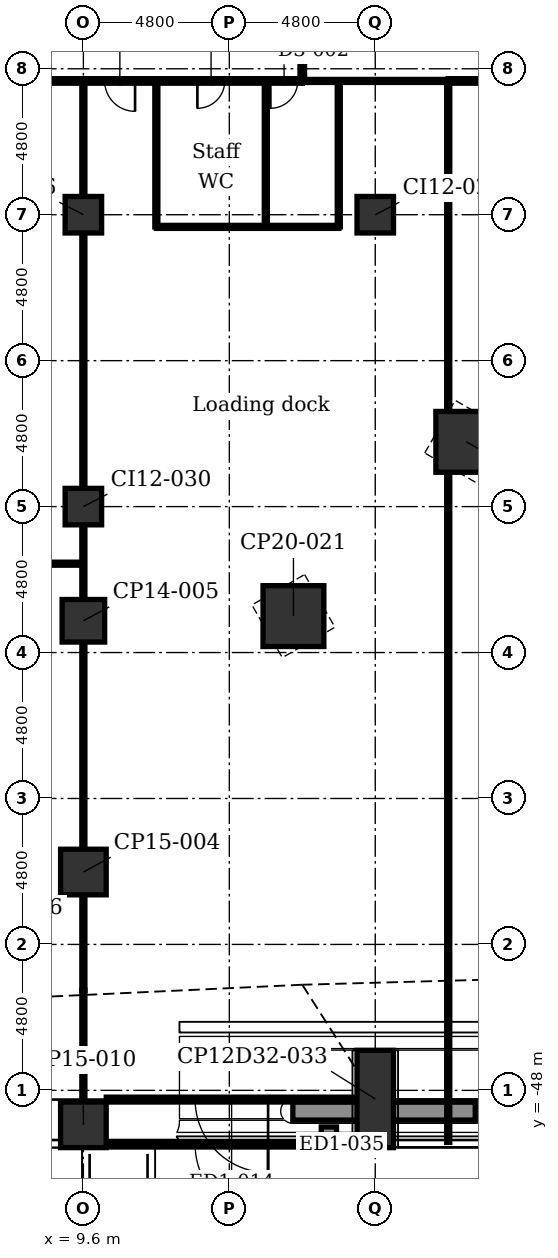
"""IFC4 building model, lengths in metres.
Left out: names, types, materials, properties, quantities, classifications, styles, units other than length and angle.
Written with IfcOpenShell. Run it as: python <this file> out.ifc"""

import sys

from ifc_helpers import new_model, si_unit, direction, frame, frame_2d, origin, origin_2d, place, context, subcontext, project, spatial, rectangle, extrude, element, fill, save


model = new_model("IFC4")
c1 = context("Model", 3, precision=1e-05, world=origin(), true_north=direction((0.0, 1.0)))
c2 = subcontext(c1, "Body", "Model", "MODEL_VIEW")
j1 = project(units=[si_unit("LENGTHUNIT", "METRE"), si_unit("PLANEANGLEUNIT", "RADIAN")], contexts=[c1])
p1 = place(None, origin())
s1 = spatial("IfcSite", under=j1, at=p1, CompositionType="ELEMENT")
p2 = place(p1, origin())
s2 = spatial("IfcBuilding", under=s1, at=p2, CompositionType="ELEMENT")
p3 = place(p2, origin())
s3 = spatial("IfcBuildingStorey", under=s2, at=p3, CompositionType="ELEMENT", Elevation=0.0)
p4 = place(p3, frame((19.2, -48.283, -0.4), z_axis=(0.0, 0.0, 1.0), x_axis=(1.0, 0.0, 0.0)))
e1 = element("IfcColumn", 1, at=p4, inside=s3, PredefinedType="COLUMN", context=c2, shape_type="SweptSolid", body=[
    extrude(rectangle(XDim=1.2, YDim=3.2, at=origin_2d()), origin(), (0.0, 0.0, 1.0), 7.1),
])
for number, where, z_axis, x_axis in (
    (2, (9.6, -49.133, -0.4), (0.0, 0.0, 1.0), (1.0, 0.0, 0.0)),
    (3, (9.6, -40.819, -0.4), (0.0, 0.0, 1.0), (1.0, 0.0, 0.0)),
):
    element("IfcColumn", number, at=place(p3, frame(where, z_axis=z_axis, x_axis=x_axis)), inside=s3, PredefinedType="COLUMN", context=c2, shape_type="SweptSolid", body=[
        extrude(rectangle(XDim=1.5, YDim=1.5, at=origin_2d()), origin(), (0.0, 0.0, 1.0), 7.1),
    ])
for number, where, z_axis, x_axis in (
    (4, (22.194, -26.67, -0.4), (0.0, 0.0, 1.0), (0.5, 0.866, 0.0)),
    (5, (16.509, -32.401, -0.4), (0.0, 0.0, 1.0), (0.866, 0.5, 0.0)),
):
    element("IfcColumn", number, at=place(p3, frame(where, z_axis=z_axis, x_axis=x_axis)), inside=s3, PredefinedType="COLUMN", context=c2, shape_type="SweptSolid", body=[
        extrude(rectangle(XDim=2.0, YDim=2.0, at=origin_2d()), origin(), (0.0, 0.0, 1.0), 7.1),
    ])
p5 = place(p3, frame((9.6, -32.555, -0.4), z_axis=(0.0, 0.0, 1.0), x_axis=(1.0, 0.0, 0.0)))
e6 = element("IfcColumn", 6, at=p5, inside=s3, PredefinedType="COLUMN", context=c2, shape_type="SweptSolid", body=[
    extrude(rectangle(XDim=1.4, YDim=1.4, at=origin_2d()), origin(), (0.0, 0.0, 1.0), 7.1),
])
for number, where, z_axis, x_axis in (
    (7, (9.6, -28.8, -0.4), (0.0, 0.0, 1.0), (1.0, 0.0, 0.0)),
    (8, (9.6, -19.2, -0.4), (0.0, 0.0, 1.0), (1.0, 0.0, 0.0)),
    (9, (19.2, -19.2, -0.4), (0.0, 0.0, 1.0), (1.0, 0.0, 0.0)),
):
    element("IfcColumn", number, at=place(p3, frame(where, z_axis=z_axis, x_axis=x_axis)), inside=s3, PredefinedType="COLUMN", context=c2, shape_type="SweptSolid", body=[
        extrude(rectangle(XDim=1.2, YDim=1.2, at=origin_2d()), origin(), (0.0, 0.0, 1.0), 7.1),
    ])
p6 = place(p3, frame((18.598, -48.303, 0.0), z_axis=(0.0, 0.0, 1.0), x_axis=(-1.0, 0.0, 0.0)))
e10 = element("IfcWall", 10, at=p6, inside=s3, PredefinedType="PARTITIONING", context=c2, shape_type="SweptSolid", body=[
    extrude(rectangle(XDim=8.246, YDim=0.16, at=frame_2d((4.123, 0.0))), origin(), (0.0, 0.0, 1.0), 6.7),
])
p7 = place(p6, frame((2.923, 0.0, 0.0)))
e11 = element("IfcOpeningElement", 11, at=p7, cuts=e10, PredefinedType="OPENING", context=c2, shape_type="SweptSolid", body=[
    extrude(rectangle(XDim=2.4, YDim=2.4, at=frame_2d((1.2, 1.2))), frame((0.0, 0.09, 0.0), z_axis=(0.0, -1.0, 0.0), x_axis=(1.0, 0.0, 0.0)), (0.0, 0.0, 1.0), 0.18),
])
p8 = place(p3, frame((18.596, -49.783, 0.0), z_axis=(0.0, 0.0, 1.0), x_axis=(-1.0, 0.0, 0.0)))
e12 = element("IfcWall", 12, at=p8, inside=s3, PredefinedType="PARTITIONING", context=c2, shape_type="SweptSolid", body=[
    extrude(rectangle(XDim=8.242, YDim=0.16, at=frame_2d((4.121, 0.0))), origin(), (0.0, 0.0, 1.0), 6.7),
])
p9 = place(p8, frame((2.921, 0.0, 0.0)))
e13 = element("IfcOpeningElement", 13, at=p9, cuts=e12, PredefinedType="OPENING", context=c2, shape_type="SweptSolid", body=[
    extrude(rectangle(XDim=2.4, YDim=2.4, at=frame_2d((1.2, 1.2))), frame((0.0, 0.09, 0.0), z_axis=(0.0, -1.0, 0.0), x_axis=(1.0, 0.0, 0.0)), (0.0, 0.0, 1.0), 0.18),
])
p10 = place(p3, frame((22.489, -48.683, 7.0), z_axis=(0.0, 0.0, 1.0), x_axis=(-1.0, 0.0, 0.0)))
e14 = element("IfcWall", 14, at=p10, inside=s3, PredefinedType="USERDEFINED", context=c2, shape_type="SweptSolid", body=[
    extrude(rectangle(XDim=6.0, YDim=0.6, at=frame_2d((3.0, 0.0))), origin(), (0.0, 0.0, 1.0), 0.7),
])
p11 = place(p3, frame((17.925, -49.453, 0.0), z_axis=(0.0, 0.0, 1.0), x_axis=(-1.0, 0.0, 0.0)))
e15 = element("IfcWall", 15, at=p11, inside=s3, PredefinedType="SOLIDWALL", context=c2, shape_type="SweptSolid", body=[
    extrude(rectangle(XDim=0.5, YDim=0.5, at=frame_2d((0.25, 0.0))), origin(), (0.0, 0.0, 1.0), 6.4),
])
p12 = place(p3, frame((21.6, -49.713, 0.0), z_axis=(0.0, 0.0, 1.0), x_axis=(0.0, 1.0, 0.0)))
e16 = element("IfcWall", 16, at=p12, inside=s3, PredefinedType="PARTITIONING", context=c2, shape_type="SweptSolid", body=[
    extrude(rectangle(XDim=34.913, YDim=0.1, at=frame_2d((17.457, 0.0))), origin(), (0.0, 0.0, 1.0), 6.7),
])
p13 = place(p3, frame((18.0, -19.6, 0.0), z_axis=(0.0, 0.0, 1.0), x_axis=(0.0, 1.0, 0.0)))
e17 = element("IfcWall", 17, at=p13, inside=s3, PredefinedType="PARTITIONING", context=c2, shape_type="SweptSolid", body=[
    extrude(rectangle(XDim=4.8, YDim=0.1, at=frame_2d((2.4, 0.0))), origin(), (0.0, 0.0, 1.0), 6.7),
])
p14 = place(p3, frame((16.8, -14.8, 0.0), z_axis=(0.0, 0.0, 1.0), x_axis=(0.0, 1.0, 0.0)))
e18 = element("IfcWall", 18, at=p14, inside=s3, PredefinedType="PARTITIONING", context=c2, shape_type="SweptSolid", body=[
    extrude(rectangle(XDim=10.85, YDim=0.15, at=frame_2d((5.425, 0.0))), origin(), (0.0, 0.0, 1.0), 6.7),
])
p15 = place(p14, frame((1.9, 0.0, 0.0)))
e19 = element("IfcOpeningElement", 19, at=p15, cuts=e18, PredefinedType="OPENING", context=c2, shape_type="SweptSolid", body=[
    extrude(rectangle(XDim=1.0, YDim=2.1, at=frame_2d((0.5, 1.05))), frame((0.0, 0.085, 0.0), z_axis=(0.0, -1.0, 0.0), x_axis=(1.0, 0.0, 0.0)), (0.0, 0.0, 1.0), 0.17),
])
p16 = place(p14, frame((8.9, 0.0, 0.0)))
e20 = element("IfcOpeningElement", 20, at=p16, cuts=e18, PredefinedType="OPENING", context=c2, shape_type="SweptSolid", body=[
    extrude(rectangle(XDim=1.0, YDim=2.1, at=frame_2d((0.5, 1.05))), frame((0.0, 0.085, 0.0), z_axis=(0.0, -1.0, 0.0), x_axis=(1.0, 0.0, 0.0)), (0.0, 0.0, 1.0), 0.17),
])
for number, where, z_axis, x_axis in (
    (21, (15.6, -19.6, 0.0), (0.0, 0.0, 1.0), (0.0, 1.0, 0.0)),
    (22, (12.0, -19.6, 0.0), (0.0, 0.0, 1.0), (0.0, 1.0, 0.0)),
):
    element("IfcWall", number, at=place(p3, frame(where, z_axis=z_axis, x_axis=x_axis)), inside=s3, PredefinedType="PARTITIONING", context=c2, shape_type="SweptSolid", body=[
        extrude(rectangle(XDim=4.8, YDim=0.1, at=frame_2d((2.4, 0.0))), origin(), (0.0, 0.0, 1.0), 6.7),
    ])
p17 = place(p3, frame((9.6, -28.24, 0.0), z_axis=(0.0, 0.0, 1.0), x_axis=(0.0, 1.0, 0.0)))
e23 = element("IfcWall", 23, at=p17, inside=s3, PredefinedType="PARTITIONING", context=c2, shape_type="SweptSolid", body=[
    extrude(rectangle(XDim=8.48, YDim=0.1, at=frame_2d((4.24, 0.0))), origin(), (0.0, 0.0, 1.0), 6.293),
])
p18 = place(p3, frame((9.6, -49.713, 0.0), z_axis=(0.0, 0.0, 1.0), x_axis=(0.0, 1.0, 0.0)))
e24 = element("IfcWall", 24, at=p18, inside=s3, PredefinedType="PARTITIONING", context=c2, shape_type="SweptSolid", body=[
    extrude(rectangle(XDim=5.01, YDim=0.1, at=frame_2d((2.505, 0.0))), origin(), (0.0, 0.0, 1.0), 6.7),
])
p19 = place(p3, frame((9.6, -44.703, 0.0), z_axis=(0.0, 0.0, 1.0), x_axis=(0.0, 1.0, 0.0)))
e25 = element("IfcWall", 25, at=p19, inside=s3, PredefinedType="PARTITIONING", context=c2, shape_type="SweptSolid", body=[
    extrude(rectangle(XDim=3.174, YDim=0.1, at=frame_2d((1.587, 0.0))), origin(), (0.0, 0.0, 1.0), 6.39),
])
p20 = place(p3, frame((9.6, -41.529, 0.0), z_axis=(0.0, 0.0, 1.0), x_axis=(0.0, 1.0, 0.0)))
e26 = element("IfcWall", 26, at=p20, inside=s3, PredefinedType="PARTITIONING", context=c2, shape_type="SweptSolid", body=[
    extrude(rectangle(XDim=1.42, YDim=0.1, at=frame_2d((0.71, 0.0))), origin(), (0.0, 0.0, 1.0), 6.7),
])
p21 = place(p3, frame((9.6, -40.109, 0.0), z_axis=(0.0, 0.0, 1.0), x_axis=(0.0, 1.0, 0.0)))
e27 = element("IfcWall", 27, at=p21, inside=s3, PredefinedType="PARTITIONING", context=c2, shape_type="SweptSolid", body=[
    extrude(rectangle(XDim=6.894, YDim=0.1, at=frame_2d((3.447, 0.0))), origin(), (0.0, 0.0, 1.0), 6.39),
])
p22 = place(p3, frame((9.6, -33.215, 0.0), z_axis=(0.0, 0.0, 1.0), x_axis=(0.0, 1.0, 0.0)))
e28 = element("IfcWall", 28, at=p22, inside=s3, PredefinedType="PARTITIONING", context=c2, shape_type="SweptSolid", body=[
    extrude(rectangle(XDim=1.32, YDim=0.1, at=frame_2d((0.66, 0.0))), origin(), (0.0, 0.0, 1.0), 6.7),
])
p23 = place(p3, frame((9.6, -31.896, 0.0), z_axis=(0.0, 0.0, 1.0), x_axis=(0.0, 1.0, 0.0)))
e29 = element("IfcWall", 29, at=p23, inside=s3, PredefinedType="PARTITIONING", context=c2, shape_type="SweptSolid", body=[
    extrude(rectangle(XDim=2.535, YDim=0.1, at=frame_2d((1.268, 0.0))), origin(), (0.0, 0.0, 1.0), 6.39),
])
for number, where, z_axis, x_axis in (
    (30, (9.6, -29.36, 0.0), (0.0, 0.0, 1.0), (0.0, 1.0, 0.0)),
    (31, (9.6, -19.76, 0.0), (0.0, 0.0, 1.0), (0.0, 1.0, 0.0)),
):
    element("IfcWall", number, at=place(p3, frame(where, z_axis=z_axis, x_axis=x_axis)), inside=s3, PredefinedType="PARTITIONING", context=c2, shape_type="SweptSolid", body=[
        extrude(rectangle(XDim=1.12, YDim=0.1, at=frame_2d((0.56, 0.0))), origin(), (0.0, 0.0, 1.0), 6.7),
    ])
p24 = place(p3, frame((9.6, -18.64, 0.0), z_axis=(0.0, 0.0, 1.0), x_axis=(0.0, 1.0, 0.0)))
e32 = element("IfcWall", 32, at=p24, inside=s3, PredefinedType="PARTITIONING", context=c2, shape_type="SweptSolid", body=[
    extrude(rectangle(XDim=3.84, YDim=0.1, at=frame_2d((1.92, 0.0))), origin(), (0.0, 0.0, 1.0), 6.293),
])
p25 = place(p3, frame((-9.6, -30.678, 0.0), z_axis=(0.0, 0.0, 1.0), x_axis=(1.0, 0.0, 0.0)))
e33 = element("IfcWall", 33, at=p25, inside=s3, PredefinedType="PARTITIONING", context=c2, shape_type="SweptSolid", body=[
    extrude(rectangle(XDim=19.2, YDim=0.1, at=frame_2d((9.6, 0.0))), origin(), (0.0, 0.0, 1.0), 6.7),
])
p26 = place(p3, frame((12.0, -19.6, 0.0), z_axis=(0.0, 0.0, 1.0), x_axis=(1.0, 0.0, 0.0)))
e34 = element("IfcWall", 34, at=p26, inside=s3, PredefinedType="PARTITIONING", context=c2, shape_type="SweptSolid", body=[
    extrude(rectangle(XDim=6.0, YDim=0.1, at=frame_2d((3.0, 0.0))), origin(), (0.0, 0.0, 1.0), 6.7),
])
p27 = place(p3, frame((16.8, -14.8, 0.0), z_axis=(0.0, 0.0, 1.0), x_axis=(1.0, 0.0, 0.0)))
e35 = element("IfcWall", 35, at=p27, inside=s3, PredefinedType="PARTITIONING", context=c2, shape_type="SweptSolid", body=[
    extrude(rectangle(XDim=4.8, YDim=0.1, at=frame_2d((2.4, 0.0))), origin(), (0.0, 0.0, 1.0), 6.7),
])
p28 = place(p3, frame((-16.8, -14.8, 0.0), z_axis=(0.0, 0.0, 1.0), x_axis=(1.0, 0.0, 0.0)))
e36 = element("IfcWall", 36, at=p28, inside=s3, PredefinedType="PARTITIONING", context=c2, shape_type="SweptSolid", body=[
    extrude(rectangle(XDim=33.6, YDim=0.15, at=frame_2d((16.8, 0.0))), origin(), (0.0, 0.0, 1.0), 6.7),
])
p29 = place(p28, frame((30.15, 0.0, 0.0)))
e37 = element("IfcOpeningElement", 37, at=p29, cuts=e36, PredefinedType="OPENING", context=c2, shape_type="SweptSolid", body=[
    extrude(rectangle(XDim=0.9, YDim=2.1, at=frame_2d((0.45, 1.05))), frame((0.0, 0.085, 0.0), z_axis=(0.0, -1.0, 0.0), x_axis=(1.0, 0.0, 0.0)), (0.0, 0.0, 1.0), 0.17),
])
p30 = place(p28, frame((32.55, 0.0, 0.0)))
e38 = element("IfcOpeningElement", 38, at=p30, cuts=e36, PredefinedType="OPENING", context=c2, shape_type="SweptSolid", body=[
    extrude(rectangle(XDim=0.9, YDim=2.1, at=frame_2d((0.45, 1.05))), frame((0.0, 0.085, 0.0), z_axis=(0.0, -1.0, 0.0), x_axis=(1.0, 0.0, 0.0)), (0.0, 0.0, 1.0), 0.17),
])
p31 = place(p28, frame((2.025, 0.0, 0.0)))
e39 = element("IfcOpeningElement", 39, at=p31, cuts=e36, PredefinedType="OPENING", context=c2, shape_type="SweptSolid", body=[
    extrude(rectangle(XDim=1.8, YDim=2.1, at=frame_2d((0.9, 1.05))), frame((0.0, 0.085, 0.0), z_axis=(0.0, -1.0, 0.0), x_axis=(1.0, 0.0, 0.0)), (0.0, 0.0, 1.0), 0.17),
])
p32 = place(p28, frame((11.775, 0.0, 0.0)))
e40 = element("IfcOpeningElement", 40, at=p32, cuts=e36, PredefinedType="OPENING", context=c2, shape_type="SweptSolid", body=[
    extrude(rectangle(XDim=1.8, YDim=2.1, at=frame_2d((0.9, 1.05))), frame((0.0, 0.085, 0.0), z_axis=(0.0, -1.0, 0.0), x_axis=(1.0, 0.0, 0.0)), (0.0, 0.0, 1.0), 0.17),
])
p33 = place(p28, frame((27.1, 0.0, 0.0)))
e41 = element("IfcOpeningElement", 41, at=p33, cuts=e36, PredefinedType="OPENING", context=c2, shape_type="SweptSolid", body=[
    extrude(rectangle(XDim=1.0, YDim=2.1, at=frame_2d((0.5, 1.05))), frame((0.0, 0.085, 0.0), z_axis=(0.0, -1.0, 0.0), x_axis=(1.0, 0.0, 0.0)), (0.0, 0.0, 1.0), 0.17),
])
p34 = place(p3, frame((21.6, -14.8, 0.0), z_axis=(0.0, 0.0, 1.0), x_axis=(1.0, 0.0, 0.0)))
e42 = element("IfcWall", 42, at=p34, inside=s3, PredefinedType="PARTITIONING", context=c2, shape_type="SweptSolid", body=[
    extrude(rectangle(XDim=23.717, YDim=0.15, at=frame_2d((11.858, 0.0))), origin(), (0.0, 0.0, 1.0), 6.7),
])
p35 = place(p7, origin())
e43 = element("IfcDoor", 43, at=p35, inside=s3, OperationType="DOUBLE_DOOR_DOUBLE_SWING", PredefinedType="DOOR", context=c2, shape_type="SweptSolid", body=[
    extrude(rectangle(XDim=2.4, YDim=2.4, at=frame_2d((1.2, 1.2))), frame((0.0, 0.025, 0.0), z_axis=(0.0, -1.0, 0.0), x_axis=(1.0, 0.0, 0.0)), (0.0, 0.0, 1.0), 0.05),
])
fill(e11, e43)
p36 = place(p9, origin())
e44 = element("IfcDoor", 44, at=p36, inside=s3, OperationType="DOUBLE_DOOR_DOUBLE_SWING", PredefinedType="DOOR", context=c2, shape_type="SweptSolid", body=[
    extrude(rectangle(XDim=2.4, YDim=2.4, at=frame_2d((1.2, 1.2))), frame((0.0, 0.025, 0.0), z_axis=(0.0, -1.0, 0.0), x_axis=(1.0, 0.0, 0.0)), (0.0, 0.0, 1.0), 0.05),
])
fill(e13, e44)
p37 = place(p29, frame((0.9, 0.0, 0.0), z_axis=(0.0, 0.0, 1.0), x_axis=(-1.0, 0.0, 0.0)))
e45 = element("IfcDoor", 45, at=p37, inside=s3, OperationType="SINGLE_SWING_LEFT", PredefinedType="DOOR", context=c2, shape_type="SweptSolid", body=[
    extrude(rectangle(XDim=0.9, YDim=2.1, at=frame_2d((0.45, 1.05))), frame((0.0, 0.025, 0.0), z_axis=(0.0, -1.0, 0.0), x_axis=(1.0, 0.0, 0.0)), (0.0, 0.0, 1.0), 0.05),
])
fill(e37, e45)
p38 = place(p30, frame((0.9, 0.0, 0.0), z_axis=(0.0, 0.0, 1.0), x_axis=(-1.0, 0.0, 0.0)))
e46 = element("IfcDoor", 46, at=p38, inside=s3, OperationType="SINGLE_SWING_LEFT", PredefinedType="DOOR", context=c2, shape_type="SweptSolid", body=[
    extrude(rectangle(XDim=0.9, YDim=2.1, at=frame_2d((0.45, 1.05))), frame((0.0, 0.025, 0.0), z_axis=(0.0, -1.0, 0.0), x_axis=(1.0, 0.0, 0.0)), (0.0, 0.0, 1.0), 0.05),
])
fill(e38, e46)
p39 = place(p33, frame((1.0, 0.0, 0.0), z_axis=(0.0, 0.0, 1.0), x_axis=(-1.0, 0.0, 0.0)))
e47 = element("IfcDoor", 47, at=p39, inside=s3, OperationType="SINGLE_SWING_RIGHT", PredefinedType="DOOR", context=c2, shape_type="SweptSolid", body=[
    extrude(rectangle(XDim=1.0, YDim=2.1, at=frame_2d((0.5, 1.05))), frame((0.0, 0.025, 0.0), z_axis=(0.0, -1.0, 0.0), x_axis=(1.0, 0.0, 0.0)), (0.0, 0.0, 1.0), 0.05),
])
fill(e41, e47)
save(model, sys.argv[1])
